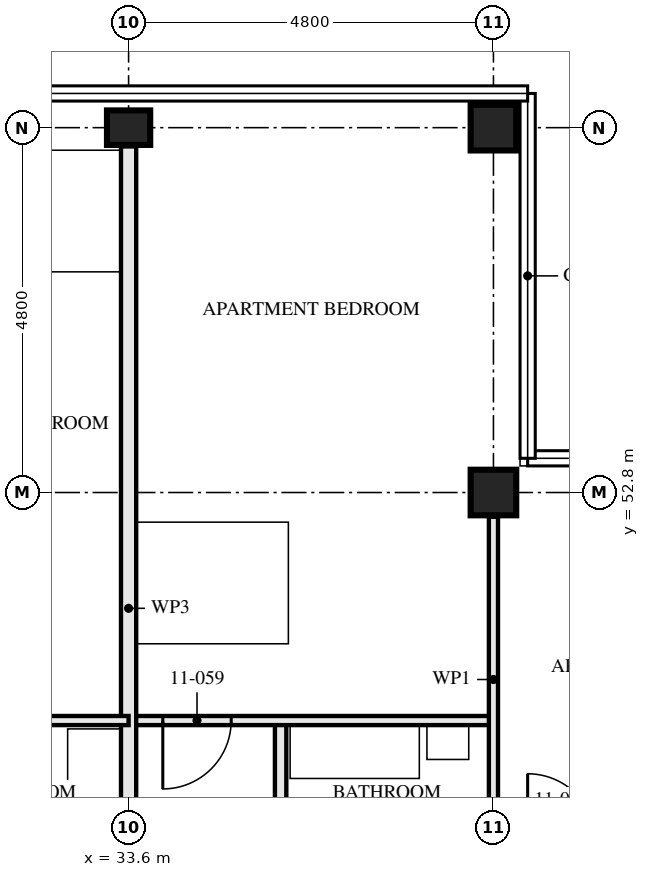
"""IFC4 building model, lengths in metres.
Left out: names, types, materials, properties, quantities, classifications, styles, units other than length and angle.
Written with IfcOpenShell. Run it as: python <this file> out.ifc"""

import sys

from ifc_helpers import new_model, si_unit, direction, frame, frame_2d, origin, origin_2d, place, context, subcontext, project, spatial, rectangle, hollow_rectangle, i_section, extrude, element, fill, save


model = new_model("IFC4")
c1 = context("Model", 3, precision=1e-05, world=origin(), true_north=direction((0.0, 1.0)))
c2 = subcontext(c1, "Body", "Model", "MODEL_VIEW")
j1 = project(units=[si_unit("LENGTHUNIT", "METRE"), si_unit("PLANEANGLEUNIT", "RADIAN")], contexts=[c1])
p1 = place(None, origin())
s1 = spatial("IfcSite", under=j1, at=p1, CompositionType="ELEMENT")
p2 = place(p1, origin())
s2 = spatial("IfcBuilding", under=s1, at=p2, CompositionType="ELEMENT")
p3 = place(p2, frame((0.0, 0.0, 44.5)))
s3 = spatial("IfcBuildingStorey", under=s2, at=p3, CompositionType="ELEMENT", Elevation=44.5)
p4 = place(p3, frame((33.6, 57.6, 0.0), z_axis=(0.0, 0.0, 1.0), x_axis=(0.0, 1.0, 0.0)))
e1 = element("IfcColumn", 1, at=p4, inside=s3, PredefinedType="COLUMN", context=c2, shape_type="SweptSolid", body=[
    extrude(i_section(OverallWidth=0.454, OverallDepth=0.569, WebThickness=0.078, FlangeThickness=0.125, FilletRadius=0.015, at=origin_2d()), origin(), (0.0, 0.0, 1.0), 3.5),
])
for number, where, z_axis, x_axis in (
    (2, (38.4, 52.8, 0.0), (0.0, 0.0, 1.0), (0.0, 1.0, 0.0)),
    (3, (38.4, 57.6, 0.0), (0.0, 0.0, 1.0), (0.0, 1.0, 0.0)),
):
    element("IfcColumn", number, at=place(p3, frame(where, z_axis=z_axis, x_axis=x_axis)), inside=s3, PredefinedType="COLUMN", context=c2, shape_type="SweptSolid", body=[
        extrude(hollow_rectangle(XDim=0.6, YDim=0.6, WallThickness=0.05, at=origin_2d()), origin(), (0.0, 0.0, 1.0), 3.5),
    ])
p5 = place(p3, frame((35.6, 49.8, 0.0), z_axis=(0.0, 0.0, 1.0), x_axis=(0.0, -1.0, 0.0)))
e4 = element("IfcWall", 4, at=p5, inside=s3, PredefinedType="PARTITIONING", context=c2, shape_type="SweptSolid", body=[
    extrude(rectangle(XDim=3.0, YDim=0.15, at=frame_2d((1.5, 0.0))), origin(), (0.0, 0.0, 1.0), 2.55),
])
p6 = place(p5, frame((1.05, 0.0, 0.0)))
e5 = element("IfcOpeningElement", 5, at=p6, cuts=e4, PredefinedType="OPENING", context=c2, shape_type="SweptSolid", body=[
    extrude(rectangle(XDim=0.9, YDim=2.1, at=frame_2d((0.45, 1.05))), frame((0.0, 0.085, 0.0), z_axis=(0.0, -1.0, 0.0), x_axis=(1.0, 0.0, 0.0)), (0.0, 0.0, 1.0), 0.171),
])
p7 = place(p3, frame((38.4, 49.8, 0.0), z_axis=(0.0, 0.0, 1.0), x_axis=(-1.0, 0.0, 0.0)))
e6 = element("IfcWall", 6, at=p7, inside=s3, PredefinedType="PARTITIONING", context=c2, shape_type="SweptSolid", body=[
    extrude(rectangle(XDim=4.8, YDim=0.12, at=frame_2d((2.4, 0.0))), origin(), (0.0, 0.0, 1.0), 3.33),
])
p8 = place(p7, frame((3.45, 0.0, 0.0)))
e7 = element("IfcOpeningElement", 7, at=p8, cuts=e6, PredefinedType="OPENING", context=c2, shape_type="SweptSolid", body=[
    extrude(rectangle(XDim=0.9, YDim=2.1, at=frame_2d((0.45, 1.05))), frame((0.0, 0.071, 0.0), z_axis=(0.0, -1.0, 0.0), x_axis=(1.0, 0.0, 0.0)), (0.0, 0.0, 1.0), 0.141),
])
p9 = place(p3, frame((38.4, 52.48, 0.0), z_axis=(0.0, 0.0, 1.0), x_axis=(0.0, -1.0, 0.0)))
e8 = element("IfcWall", 8, at=p9, inside=s3, PredefinedType="PARTITIONING", context=c2, shape_type="SweptSolid", body=[
    extrude(rectangle(XDim=4.28, YDim=0.12, at=frame_2d((2.14, 0.0))), origin(), (0.0, 0.0, 1.0), 3.33),
])
p10 = place(p3, frame((33.6, 57.353, 0.0), z_axis=(0.0, 0.0, 1.0), x_axis=(0.0, -1.0, 0.0)))
e9 = element("IfcWall", 9, at=p10, inside=s3, PredefinedType="PARTITIONING", context=c2, shape_type="SweptSolid", body=[
    extrude(rectangle(XDim=12.153, YDim=0.2, at=frame_2d((6.077, 0.0))), origin(), (0.0, 0.0, 1.0), 2.55),
])
p11 = place(p3, frame((33.6, 49.8, 0.0), z_axis=(0.0, 0.0, 1.0), x_axis=(-1.0, 0.0, 0.0)))
e10 = element("IfcWall", 10, at=p11, inside=s3, PredefinedType="PARTITIONING", context=c2, shape_type="SweptSolid", body=[
    extrude(rectangle(XDim=4.8, YDim=0.12, at=frame_2d((2.4, 0.0))), origin(), (0.0, 0.0, 1.0), 3.33),
])
p12 = place(p11, frame((3.45, 0.0, 0.0)))
e11 = element("IfcOpeningElement", 11, at=p12, cuts=e10, PredefinedType="OPENING", context=c2, shape_type="SweptSolid", body=[
    extrude(rectangle(XDim=0.9, YDim=2.1, at=frame_2d((0.45, 1.05))), frame((0.0, 0.071, 0.0), z_axis=(0.0, -1.0, 0.0), x_axis=(1.0, 0.0, 0.0)), (0.0, 0.0, 1.0), 0.141),
])
p13 = place(p8, origin())
e12 = element("IfcDoor", 12, at=p13, inside=s3, OperationType="SINGLE_SWING_LEFT", PredefinedType="DOOR", context=c2, shape_type="SweptSolid", body=[
    extrude(rectangle(XDim=0.9, YDim=2.1, at=frame_2d((0.45, 1.05))), frame((0.0, 0.022, 0.0), z_axis=(0.0, -1.0, 0.0), x_axis=(1.0, 0.0, 0.0)), (0.0, 0.0, 1.0), 0.044),
])
fill(e7, e12)
save(model, sys.argv[1])
